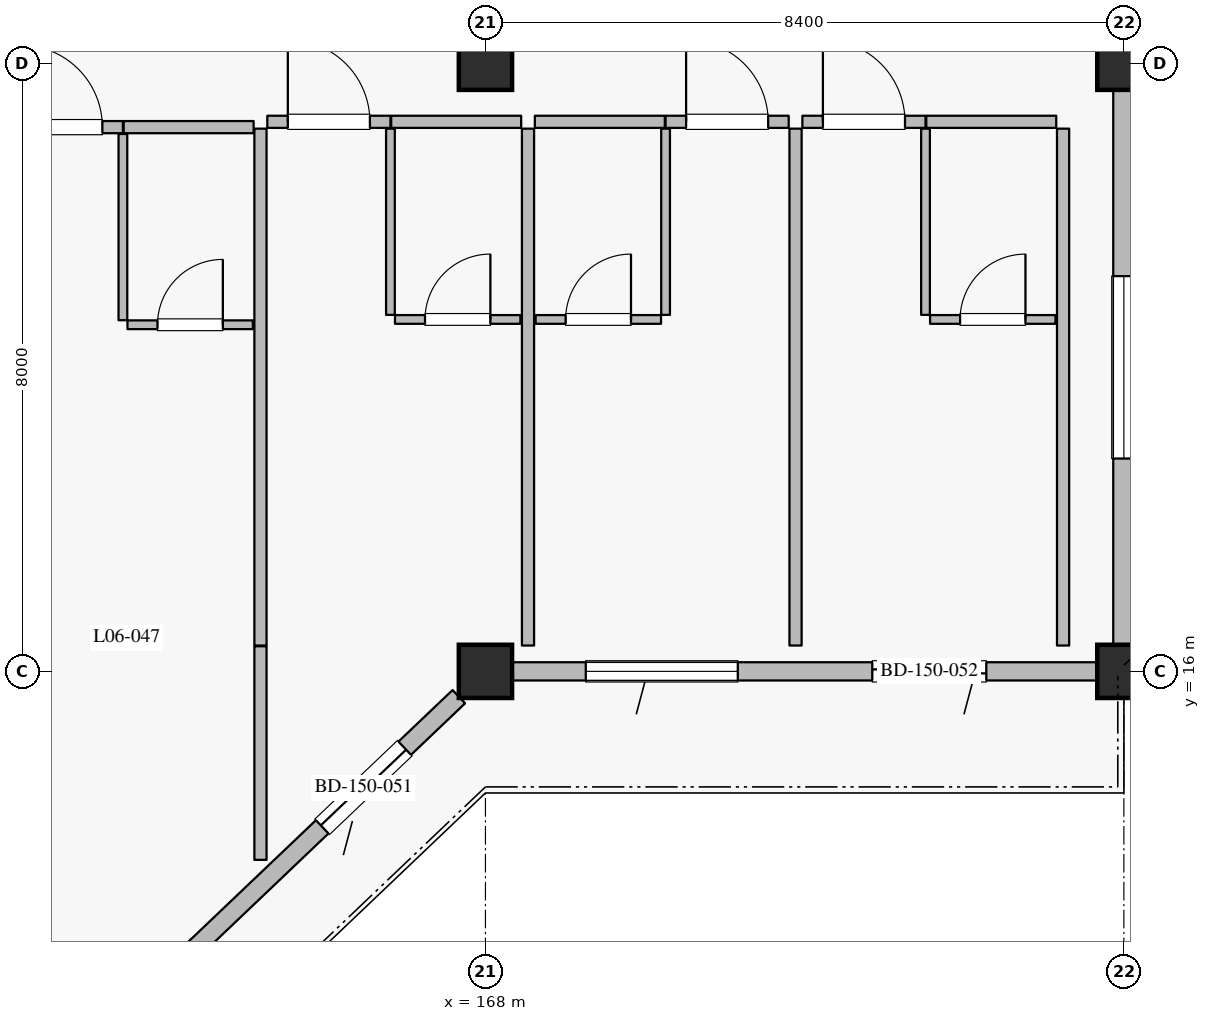
"""IFC4 building model, lengths in metres.
Left out: names, types, materials, properties, quantities, classifications, styles, units other than length and angle.
Written with IfcOpenShell. Run it as: python <this file> out.ifc"""

import sys

from ifc_helpers import new_model, si_unit, direction, frame, frame_2d, origin, origin_2d, place, context, subcontext, project, spatial, rectangle, extrude, element, fill, save


model = new_model("IFC4")
c1 = context("Model", 3, precision=1e-05, world=origin(), true_north=direction((0.0, 1.0)))
c2 = subcontext(c1, "Body", "Model", "MODEL_VIEW")
j1 = project(units=[si_unit("LENGTHUNIT", "METRE"), si_unit("PLANEANGLEUNIT", "RADIAN")], contexts=[c1])
p1 = place(None, origin())
s1 = spatial("IfcSite", under=j1, at=p1, CompositionType="ELEMENT")
p2 = place(p1, origin())
s2 = spatial("IfcBuilding", under=s1, at=p2, CompositionType="ELEMENT")
p3 = place(p2, frame((0.0, 0.0, 28.8)))
s3 = spatial("IfcBuildingStorey", under=s2, at=p3, CompositionType="ELEMENT", Elevation=28.8)
for number, where, z_axis, x_axis in (
    (1, (168.0, 16.0, 0.0), (0.0, 0.0, 1.0), (1.0, 0.0, 0.0)),
    (2, (176.4, 16.0, 0.0), (0.0, 0.0, 1.0), (1.0, 0.0, 0.0)),
    (3, (168.0, 24.0, 0.0), (0.0, 0.0, 1.0), (1.0, 0.0, 0.0)),
    (4, (176.4, 24.0, 0.0), (0.0, 0.0, 1.0), (1.0, 0.0, 0.0)),
):
    element("IfcColumn", number, at=place(p3, frame(where, z_axis=z_axis, x_axis=x_axis)), inside=s3, PredefinedType="COLUMN", context=c2, shape_type="SweptSolid", body=[
        extrude(rectangle(XDim=0.7, YDim=0.7, at=origin_2d()), origin(), (0.0, 0.0, 1.0), 3.6),
    ])
p4 = place(p3, frame((167.65, 15.667, 0.0), z_axis=(0.0, 0.0, 1.0), x_axis=(-0.724105170588, -0.689689569247, 0.0)))
e5 = element("IfcWall", 5, at=p4, inside=s3, PredefinedType="SOLIDWALL", context=c2, shape_type="SweptSolid", body=[
    extrude(rectangle(XDim=10.634, YDim=0.24, at=frame_2d((5.317, 0.0))), origin(), (0.0, 0.0, 1.0), 2.93),
])
p5 = place(p4, frame((0.983, 0.0, 0.0)))
e6 = element("IfcOpeningElement", 6, at=p5, cuts=e5, PredefinedType="OPENING", context=c2, shape_type="SweptSolid", body=[
    extrude(rectangle(XDim=1.5, YDim=2.25, at=frame_2d((0.75, 1.125))), frame((0.0, 0.13, 0.0), z_axis=(0.0, -1.0, 0.0), x_axis=(1.0, 0.0, 0.0)), (0.0, 0.0, 1.0), 0.26),
])
p6 = place(p4, frame((5.035, 0.0, 0.8)))
e7 = element("IfcOpeningElement", 7, at=p6, cuts=e5, PredefinedType="OPENING", context=c2, shape_type="SweptSolid", body=[
    extrude(rectangle(XDim=2.0, YDim=1.75, at=frame_2d((1.0, 0.875))), frame((0.0, 0.13, 0.0), z_axis=(0.0, -1.0, 0.0), x_axis=(1.0, 0.0, 0.0)), (0.0, 0.0, 1.0), 0.26),
])
p7 = place(p4, frame((8.819, 0.0, 0.8)))
e8 = element("IfcOpeningElement", 8, at=p7, cuts=e5, PredefinedType="OPENING", context=c2, shape_type="SweptSolid", body=[
    extrude(rectangle(XDim=1.6, YDim=1.6, at=frame_2d((0.8, 0.8))), frame((0.0, 0.13, 0.0), z_axis=(0.0, -1.0, 0.0), x_axis=(1.0, 0.0, 0.0)), (0.0, 0.0, 1.0), 0.26),
])
p8 = place(p3, frame((176.05, 16.0, 0.0), z_axis=(0.0, 0.0, 1.0), x_axis=(-1.0, 0.0, 0.0)))
e9 = element("IfcWall", 9, at=p8, inside=s3, PredefinedType="SOLIDWALL", context=c2, shape_type="SweptSolid", body=[
    extrude(rectangle(XDim=7.7, YDim=0.24, at=frame_2d((3.85, 0.0))), origin(), (0.0, 0.0, 1.0), 2.93),
])
p9 = place(p8, frame((1.46, 0.0, 0.0)))
e10 = element("IfcOpeningElement", 10, at=p9, cuts=e9, PredefinedType="OPENING", context=c2, shape_type="SweptSolid", body=[
    extrude(rectangle(XDim=1.5, YDim=2.25, at=frame_2d((0.75, 1.125))), frame((0.0, 0.13, 0.0), z_axis=(0.0, -1.0, 0.0), x_axis=(1.0, 0.0, 0.0)), (0.0, 0.0, 1.0), 0.26),
])
p10 = place(p8, frame((4.73, 0.0, 0.8)))
e11 = element("IfcOpeningElement", 11, at=p10, cuts=e9, PredefinedType="OPENING", context=c2, shape_type="SweptSolid", body=[
    extrude(rectangle(XDim=2.0, YDim=1.75, at=frame_2d((1.0, 0.875))), frame((0.0, 0.13, 0.0), z_axis=(0.0, -1.0, 0.0), x_axis=(1.0, 0.0, 0.0)), (0.0, 0.0, 1.0), 0.26),
])
p11 = place(p3, frame((176.4, 23.65, 0.0), z_axis=(0.0, 0.0, 1.0), x_axis=(0.0, -1.0, 0.0)))
e12 = element("IfcWall", 12, at=p11, inside=s3, PredefinedType="SOLIDWALL", context=c2, shape_type="SweptSolid", body=[
    extrude(rectangle(XDim=7.3, YDim=0.28, at=frame_2d((3.65, 0.0))), origin(), (0.0, 0.0, 1.0), 2.7),
])
p12 = place(p11, frame((2.45, 0.0, 0.5)))
e13 = element("IfcOpeningElement", 13, at=p12, cuts=e12, PredefinedType="OPENING", context=c2, shape_type="SweptSolid", body=[
    extrude(rectangle(XDim=2.4, YDim=1.65, at=frame_2d((1.2, 0.825))), frame((0.0, 0.15, 0.0), z_axis=(0.0, -1.0, 0.0), x_axis=(1.0, 0.0, 0.0)), (0.0, 0.0, 1.0), 0.3),
])
p13 = place(p3, frame((161.61, 23.16, 0.0), z_axis=(0.0, 0.0, 1.0), x_axis=(1.0, 0.0, 0.0)))
e14 = element("IfcWall", 14, at=p13, inside=s3, PredefinedType="PARTITIONING", context=c2, shape_type="SweptSolid", body=[
    extrude(rectangle(XDim=1.62, YDim=0.16, at=frame_2d((0.81, 0.0))), origin(), (0.0, 0.0, 1.0), 3.365),
])
p14 = place(p13, frame((0.27, 0.0, 0.0)))
e15 = element("IfcOpeningElement", 15, at=p14, cuts=e14, PredefinedType="OPENING", context=c2, shape_type="SweptSolid", body=[
    extrude(rectangle(XDim=1.08, YDim=2.3, at=frame_2d((0.54, 1.15))), frame((0.0, 0.09, 0.0), z_axis=(0.0, -1.0, 0.0), x_axis=(1.0, 0.0, 0.0)), (0.0, 0.0, 1.0), 0.18),
])
p15 = place(p3, frame((163.24, 23.16, 0.0), z_axis=(0.0, 0.0, 1.0), x_axis=(1.0, 0.0, 0.0)))
e16 = element("IfcWall", 16, at=p15, inside=s3, PredefinedType="PARTITIONING", context=c2, shape_type="SweptSolid", body=[
    extrude(rectangle(XDim=1.71, YDim=0.16, at=frame_2d((0.855, 0.0))), origin(), (0.0, 0.0, 1.0), 3.365),
])
p16 = place(p3, frame((163.23, 20.62, 0.0), z_axis=(0.0, 0.0, 1.0), x_axis=(0.0, 1.0, 0.0)))
e17 = element("IfcWall", 17, at=p16, inside=s3, PredefinedType="PARTITIONING", context=c2, shape_type="SweptSolid", body=[
    extrude(rectangle(XDim=2.45, YDim=0.115, at=frame_2d((1.225, 0.0))), origin(), (0.0, 0.0, 1.0), 3.365),
])
p17 = place(p3, frame((163.29, 20.56, 0.0), z_axis=(0.0, 0.0, 1.0), x_axis=(1.0, 0.0, 0.0)))
e18 = element("IfcWall", 18, at=p17, inside=s3, PredefinedType="PARTITIONING", context=c2, shape_type="SweptSolid", body=[
    extrude(rectangle(XDim=1.65, YDim=0.115, at=frame_2d((0.825, 0.0))), origin(), (0.0, 0.0, 1.0), 3.365),
])
p18 = place(p17, frame((0.395, 0.0, 0.0)))
e19 = element("IfcOpeningElement", 19, at=p18, cuts=e18, PredefinedType="OPENING", context=c2, shape_type="SweptSolid", body=[
    extrude(rectangle(XDim=0.86, YDim=2.12, at=frame_2d((0.43, 1.06))), frame((0.0, 0.067, 0.0), z_axis=(0.0, -1.0, 0.0), x_axis=(1.0, 0.0, 0.0)), (0.0, 0.0, 1.0), 0.135),
])
p19 = place(p3, frame((165.04, 13.52, 0.0), z_axis=(0.0, 0.0, 1.0), x_axis=(0.0, 1.0, 0.0)))
e20 = element("IfcWall", 20, at=p19, inside=s3, PredefinedType="PARTITIONING", context=c2, shape_type="SweptSolid", body=[
    extrude(rectangle(XDim=2.81, YDim=0.16, at=frame_2d((1.405, 0.0))), origin(), (0.0, 0.0, 1.0), 3.365),
])
p20 = place(p3, frame((165.13, 23.23, 0.0), z_axis=(0.0, 0.0, 1.0), x_axis=(1.0, 0.0, 0.0)))
e21 = element("IfcWall", 21, at=p20, inside=s3, PredefinedType="PARTITIONING", context=c2, shape_type="SweptSolid", body=[
    extrude(rectangle(XDim=1.62, YDim=0.16, at=frame_2d((0.81, 0.0))), origin(), (0.0, 0.0, 1.0), 3.365),
])
p21 = place(p20, frame((0.27, 0.0, 0.0)))
e22 = element("IfcOpeningElement", 22, at=p21, cuts=e21, PredefinedType="OPENING", context=c2, shape_type="SweptSolid", body=[
    extrude(rectangle(XDim=1.08, YDim=2.3, at=frame_2d((0.54, 1.15))), frame((0.0, 0.09, 0.0), z_axis=(0.0, -1.0, 0.0), x_axis=(1.0, 0.0, 0.0)), (0.0, 0.0, 1.0), 0.18),
])
p22 = place(p3, frame((166.76, 23.23, 0.0), z_axis=(0.0, 0.0, 1.0), x_axis=(1.0, 0.0, 0.0)))
e23 = element("IfcWall", 23, at=p22, inside=s3, PredefinedType="PARTITIONING", context=c2, shape_type="SweptSolid", body=[
    extrude(rectangle(XDim=1.71, YDim=0.16, at=frame_2d((0.855, 0.0))), origin(), (0.0, 0.0, 1.0), 3.365),
])
p23 = place(p3, frame((166.75, 20.69, 0.0), z_axis=(0.0, 0.0, 1.0), x_axis=(0.0, 1.0, 0.0)))
e24 = element("IfcWall", 24, at=p23, inside=s3, PredefinedType="PARTITIONING", context=c2, shape_type="SweptSolid", body=[
    extrude(rectangle(XDim=2.45, YDim=0.115, at=frame_2d((1.225, 0.0))), origin(), (0.0, 0.0, 1.0), 3.365),
])
p24 = place(p3, frame((166.81, 20.63, 0.0), z_axis=(0.0, 0.0, 1.0), x_axis=(1.0, 0.0, 0.0)))
e25 = element("IfcWall", 25, at=p24, inside=s3, PredefinedType="PARTITIONING", context=c2, shape_type="SweptSolid", body=[
    extrude(rectangle(XDim=1.65, YDim=0.115, at=frame_2d((0.825, 0.0))), origin(), (0.0, 0.0, 1.0), 3.365),
])
p25 = place(p24, frame((0.395, 0.0, 0.0)))
e26 = element("IfcOpeningElement", 26, at=p25, cuts=e25, PredefinedType="OPENING", context=c2, shape_type="SweptSolid", body=[
    extrude(rectangle(XDim=0.86, YDim=2.12, at=frame_2d((0.43, 1.06))), frame((0.0, 0.067, 0.0), z_axis=(0.0, -1.0, 0.0), x_axis=(1.0, 0.0, 0.0)), (0.0, 0.0, 1.0), 0.135),
])
p26 = place(p3, frame((165.04, 16.34, 0.0), z_axis=(0.0, 0.0, 1.0), x_axis=(0.0, 1.0, 0.0)))
e27 = element("IfcWall", 27, at=p26, inside=s3, PredefinedType="PARTITIONING", context=c2, shape_type="SweptSolid", body=[
    extrude(rectangle(XDim=6.8, YDim=0.16, at=frame_2d((3.4, 0.0))), origin(), (0.0, 0.0, 1.0), 3.365),
])
p27 = place(p3, frame((168.65, 23.23, 0.0), z_axis=(0.0, 0.0, 1.0), x_axis=(1.0, 0.0, 0.0)))
e28 = element("IfcWall", 28, at=p27, inside=s3, PredefinedType="PARTITIONING", context=c2, shape_type="SweptSolid", body=[
    extrude(rectangle(XDim=1.71, YDim=0.16, at=frame_2d((0.855, 0.0))), origin(), (0.0, 0.0, 1.0), 3.365),
])
p28 = place(p3, frame((170.37, 23.23, 0.0), z_axis=(0.0, 0.0, 1.0), x_axis=(1.0, 0.0, 0.0)))
e29 = element("IfcWall", 29, at=p28, inside=s3, PredefinedType="PARTITIONING", context=c2, shape_type="SweptSolid", body=[
    extrude(rectangle(XDim=1.62, YDim=0.16, at=frame_2d((0.81, 0.0))), origin(), (0.0, 0.0, 1.0), 3.365),
])
p29 = place(p28, frame((0.27, 0.0, 0.0)))
e30 = element("IfcOpeningElement", 30, at=p29, cuts=e29, PredefinedType="OPENING", context=c2, shape_type="SweptSolid", body=[
    extrude(rectangle(XDim=1.08, YDim=2.3, at=frame_2d((0.54, 1.15))), frame((0.0, 0.09, 0.0), z_axis=(0.0, -1.0, 0.0), x_axis=(1.0, 0.0, 0.0)), (0.0, 0.0, 1.0), 0.18),
])
p30 = place(p3, frame((170.37, 20.69, 0.0), z_axis=(0.0, 0.0, 1.0), x_axis=(0.0, 1.0, 0.0)))
e31 = element("IfcWall", 31, at=p30, inside=s3, PredefinedType="PARTITIONING", context=c2, shape_type="SweptSolid", body=[
    extrude(rectangle(XDim=2.45, YDim=0.115, at=frame_2d((1.225, 0.0))), origin(), (0.0, 0.0, 1.0), 3.365),
])
p31 = place(p3, frame((168.66, 20.63, 0.0), z_axis=(0.0, 0.0, 1.0), x_axis=(1.0, 0.0, 0.0)))
e32 = element("IfcWall", 32, at=p31, inside=s3, PredefinedType="PARTITIONING", context=c2, shape_type="SweptSolid", body=[
    extrude(rectangle(XDim=1.65, YDim=0.115, at=frame_2d((0.825, 0.0))), origin(), (0.0, 0.0, 1.0), 3.365),
])
p32 = place(p31, frame((0.395, 0.0, 0.0)))
e33 = element("IfcOpeningElement", 33, at=p32, cuts=e32, PredefinedType="OPENING", context=c2, shape_type="SweptSolid", body=[
    extrude(rectangle(XDim=0.86, YDim=2.12, at=frame_2d((0.43, 1.06))), frame((0.0, 0.067, 0.0), z_axis=(0.0, -1.0, 0.0), x_axis=(1.0, 0.0, 0.0)), (0.0, 0.0, 1.0), 0.135),
])
p33 = place(p3, frame((168.56, 16.34, 0.0), z_axis=(0.0, 0.0, 1.0), x_axis=(0.0, 1.0, 0.0)))
e34 = element("IfcWall", 34, at=p33, inside=s3, PredefinedType="PARTITIONING", context=c2, shape_type="SweptSolid", body=[
    extrude(rectangle(XDim=6.8, YDim=0.16, at=frame_2d((3.4, 0.0))), origin(), (0.0, 0.0, 1.0), 3.365),
])
p34 = place(p3, frame((172.17, 23.23, 0.0), z_axis=(0.0, 0.0, 1.0), x_axis=(1.0, 0.0, 0.0)))
e35 = element("IfcWall", 35, at=p34, inside=s3, PredefinedType="PARTITIONING", context=c2, shape_type="SweptSolid", body=[
    extrude(rectangle(XDim=1.62, YDim=0.16, at=frame_2d((0.81, 0.0))), origin(), (0.0, 0.0, 1.0), 3.365),
])
p35 = place(p34, frame((0.27, 0.0, 0.0)))
e36 = element("IfcOpeningElement", 36, at=p35, cuts=e35, PredefinedType="OPENING", context=c2, shape_type="SweptSolid", body=[
    extrude(rectangle(XDim=1.08, YDim=2.3, at=frame_2d((0.54, 1.15))), frame((0.0, 0.09, 0.0), z_axis=(0.0, -1.0, 0.0), x_axis=(1.0, 0.0, 0.0)), (0.0, 0.0, 1.0), 0.18),
])
p36 = place(p3, frame((173.8, 23.23, 0.0), z_axis=(0.0, 0.0, 1.0), x_axis=(1.0, 0.0, 0.0)))
e37 = element("IfcWall", 37, at=p36, inside=s3, PredefinedType="PARTITIONING", context=c2, shape_type="SweptSolid", body=[
    extrude(rectangle(XDim=1.71, YDim=0.16, at=frame_2d((0.855, 0.0))), origin(), (0.0, 0.0, 1.0), 3.365),
])
p37 = place(p3, frame((173.79, 20.69, 0.0), z_axis=(0.0, 0.0, 1.0), x_axis=(0.0, 1.0, 0.0)))
e38 = element("IfcWall", 38, at=p37, inside=s3, PredefinedType="PARTITIONING", context=c2, shape_type="SweptSolid", body=[
    extrude(rectangle(XDim=2.45, YDim=0.115, at=frame_2d((1.225, 0.0))), origin(), (0.0, 0.0, 1.0), 3.365),
])
p38 = place(p3, frame((173.85, 20.63, 0.0), z_axis=(0.0, 0.0, 1.0), x_axis=(1.0, 0.0, 0.0)))
e39 = element("IfcWall", 39, at=p38, inside=s3, PredefinedType="PARTITIONING", context=c2, shape_type="SweptSolid", body=[
    extrude(rectangle(XDim=1.65, YDim=0.115, at=frame_2d((0.825, 0.0))), origin(), (0.0, 0.0, 1.0), 3.365),
])
p39 = place(p38, frame((0.395, 0.0, 0.0)))
e40 = element("IfcOpeningElement", 40, at=p39, cuts=e39, PredefinedType="OPENING", context=c2, shape_type="SweptSolid", body=[
    extrude(rectangle(XDim=0.86, YDim=2.12, at=frame_2d((0.43, 1.06))), frame((0.0, 0.067, 0.0), z_axis=(0.0, -1.0, 0.0), x_axis=(1.0, 0.0, 0.0)), (0.0, 0.0, 1.0), 0.135),
])
for number, where, z_axis, x_axis in (
    (41, (172.08, 16.34, 0.0), (0.0, 0.0, 1.0), (0.0, 1.0, 0.0)),
    (42, (175.6, 16.34, 0.0), (0.0, 0.0, 1.0), (0.0, 1.0, 0.0)),
):
    element("IfcWall", number, at=place(p3, frame(where, z_axis=z_axis, x_axis=x_axis)), inside=s3, PredefinedType="PARTITIONING", context=c2, shape_type="SweptSolid", body=[
        extrude(rectangle(XDim=6.8, YDim=0.16, at=frame_2d((3.4, 0.0))), origin(), (0.0, 0.0, 1.0), 3.365),
    ])
p40 = place(p5, origin())
e43 = element("IfcDoor", 43, at=p40, inside=s3, OperationType="SLIDING_TO_LEFT", PredefinedType="DOOR", context=c2, shape_type="SweptSolid", body=[
    extrude(rectangle(XDim=1.5, YDim=2.25, at=frame_2d((0.75, 1.125))), frame((0.0, 0.025, 0.0), z_axis=(0.0, -1.0, 0.0), x_axis=(1.0, 0.0, 0.0)), (0.0, 0.0, 1.0), 0.05),
])
fill(e6, e43)
p41 = place(p9, origin())
e44 = element("IfcDoor", 44, at=p41, inside=s3, OperationType="SLIDING_TO_LEFT", PredefinedType="DOOR", context=c2, shape_type="SweptSolid", body=[
    extrude(rectangle(XDim=1.5, YDim=2.25, at=frame_2d((0.75, 1.125))), frame((0.0, 0.025, 0.0), z_axis=(0.0, -1.0, 0.0), x_axis=(1.0, 0.0, 0.0)), (0.0, 0.0, 1.0), 0.05),
])
fill(e10, e44)
p42 = place(p10, origin())
e45 = element("IfcWindow", 45, at=p42, inside=s3, PartitioningType="DOUBLE_PANEL_VERTICAL", PredefinedType="WINDOW", context=c2, shape_type="SweptSolid", body=[
    extrude(rectangle(XDim=2.0, YDim=1.75, at=frame_2d((1.0, 0.875))), frame((0.0, 0.03, 0.0), z_axis=(0.0, -1.0, 0.0), x_axis=(1.0, 0.0, 0.0)), (0.0, 0.0, 1.0), 0.06),
])
fill(e11, e45)
p43 = place(p12, origin())
e46 = element("IfcWindow", 46, at=p43, inside=s3, PartitioningType="DOUBLE_PANEL_VERTICAL", PredefinedType="WINDOW", context=c2, shape_type="SweptSolid", body=[
    extrude(rectangle(XDim=2.4, YDim=1.65, at=frame_2d((1.2, 0.825))), frame((0.0, 0.03, 0.0), z_axis=(0.0, -1.0, 0.0), x_axis=(1.0, 0.0, 0.0)), (0.0, 0.0, 1.0), 0.06),
])
fill(e13, e46)
p44 = place(p14, origin())
e47 = element("IfcDoor", 47, at=p44, inside=s3, OperationType="SINGLE_SWING_LEFT", PredefinedType="DOOR", context=c2, shape_type="SweptSolid", body=[
    extrude(rectangle(XDim=1.08, YDim=2.3, at=frame_2d((0.54, 1.15))), frame((0.0, 0.025, 0.0), z_axis=(0.0, -1.0, 0.0), x_axis=(1.0, 0.0, 0.0)), (0.0, 0.0, 1.0), 0.05),
])
fill(e15, e47)
p45 = place(p18, origin())
e48 = element("IfcDoor", 48, at=p45, inside=s3, OperationType="SINGLE_SWING_RIGHT", PredefinedType="DOOR", context=c2, shape_type="SweptSolid", body=[
    extrude(rectangle(XDim=0.86, YDim=2.12, at=frame_2d((0.43, 1.06))), frame((0.0, 0.025, 0.0), z_axis=(0.0, -1.0, 0.0), x_axis=(1.0, 0.0, 0.0)), (0.0, 0.0, 1.0), 0.05),
])
fill(e19, e48)
p46 = place(p21, origin())
e49 = element("IfcDoor", 49, at=p46, inside=s3, OperationType="SINGLE_SWING_LEFT", PredefinedType="DOOR", context=c2, shape_type="SweptSolid", body=[
    extrude(rectangle(XDim=1.08, YDim=2.3, at=frame_2d((0.54, 1.15))), frame((0.0, 0.025, 0.0), z_axis=(0.0, -1.0, 0.0), x_axis=(1.0, 0.0, 0.0)), (0.0, 0.0, 1.0), 0.05),
])
fill(e22, e49)
p47 = place(p25, origin())
e50 = element("IfcDoor", 50, at=p47, inside=s3, OperationType="SINGLE_SWING_RIGHT", PredefinedType="DOOR", context=c2, shape_type="SweptSolid", body=[
    extrude(rectangle(XDim=0.86, YDim=2.12, at=frame_2d((0.43, 1.06))), frame((0.0, 0.025, 0.0), z_axis=(0.0, -1.0, 0.0), x_axis=(1.0, 0.0, 0.0)), (0.0, 0.0, 1.0), 0.05),
])
fill(e26, e50)
p48 = place(p29, origin())
e51 = element("IfcDoor", 51, at=p48, inside=s3, OperationType="SINGLE_SWING_LEFT", PredefinedType="DOOR", context=c2, shape_type="SweptSolid", body=[
    extrude(rectangle(XDim=1.08, YDim=2.3, at=frame_2d((0.54, 1.15))), frame((0.0, 0.025, 0.0), z_axis=(0.0, -1.0, 0.0), x_axis=(1.0, 0.0, 0.0)), (0.0, 0.0, 1.0), 0.05),
])
fill(e30, e51)
p49 = place(p32, origin())
e52 = element("IfcDoor", 52, at=p49, inside=s3, OperationType="SINGLE_SWING_RIGHT", PredefinedType="DOOR", context=c2, shape_type="SweptSolid", body=[
    extrude(rectangle(XDim=0.86, YDim=2.12, at=frame_2d((0.43, 1.06))), frame((0.0, 0.025, 0.0), z_axis=(0.0, -1.0, 0.0), x_axis=(1.0, 0.0, 0.0)), (0.0, 0.0, 1.0), 0.05),
])
fill(e33, e52)
p50 = place(p35, origin())
e53 = element("IfcDoor", 53, at=p50, inside=s3, OperationType="SINGLE_SWING_LEFT", PredefinedType="DOOR", context=c2, shape_type="SweptSolid", body=[
    extrude(rectangle(XDim=1.08, YDim=2.3, at=frame_2d((0.54, 1.15))), frame((0.0, 0.025, 0.0), z_axis=(0.0, -1.0, 0.0), x_axis=(1.0, 0.0, 0.0)), (0.0, 0.0, 1.0), 0.05),
])
fill(e36, e53)
p51 = place(p39, origin())
e54 = element("IfcDoor", 54, at=p51, inside=s3, OperationType="SINGLE_SWING_RIGHT", PredefinedType="DOOR", context=c2, shape_type="SweptSolid", body=[
    extrude(rectangle(XDim=0.86, YDim=2.12, at=frame_2d((0.43, 1.06))), frame((0.0, 0.025, 0.0), z_axis=(0.0, -1.0, 0.0), x_axis=(1.0, 0.0, 0.0)), (0.0, 0.0, 1.0), 0.05),
])
fill(e40, e54)
save(model, sys.argv[1])
